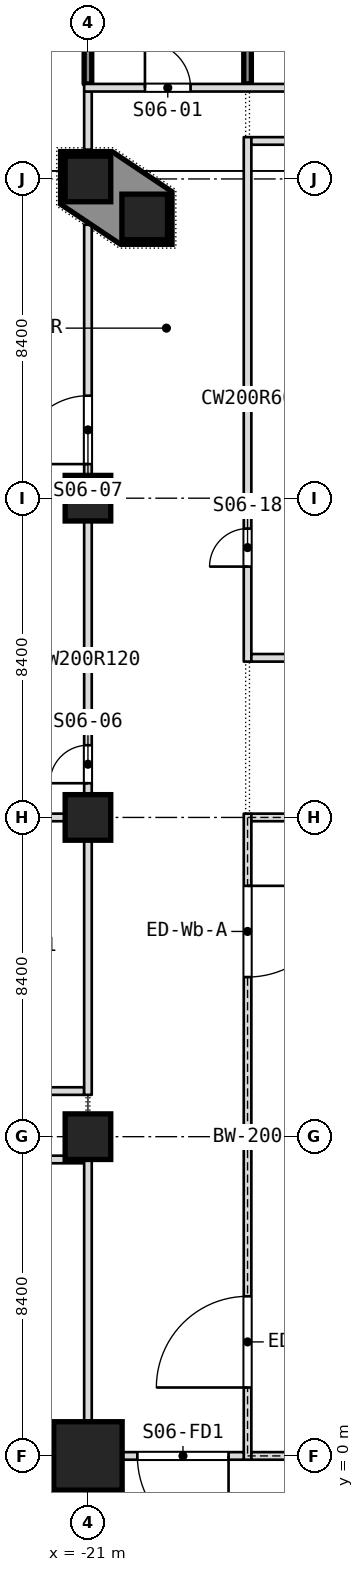
"""IFC4 building model, lengths in metres.
Left out: names, types, materials, properties, quantities, classifications, styles, units other than length and angle.
Written with IfcOpenShell. Run it as: python <this file> out.ifc"""

import sys

from ifc_helpers import new_model, si_unit, direction, frame, frame_2d, origin, origin_2d, place, context, subcontext, project, spatial, polyline, rectangle, outline, extrude, element, fill, save


model = new_model("IFC4")
c1 = context("Model", 3, precision=1e-05, world=origin(), true_north=direction((0.0, 1.0)))
c2 = subcontext(c1, "Body", "Model", "MODEL_VIEW")
j1 = project(units=[si_unit("LENGTHUNIT", "METRE"), si_unit("PLANEANGLEUNIT", "RADIAN")], contexts=[c1])
p1 = place(None, origin())
s1 = spatial("IfcSite", under=j1, at=p1, CompositionType="ELEMENT")
p2 = place(p1, origin())
s2 = spatial("IfcBuilding", under=s1, at=p2, CompositionType="ELEMENT")
p3 = place(p2, frame((0.0, 0.0, 31.0)))
s3 = spatial("IfcBuildingStorey", under=s2, at=p3, CompositionType="ELEMENT", Elevation=31.0)
p4 = place(p3, frame((-21.0, 0.0, 0.0), z_axis=(0.0, 0.0, 1.0), x_axis=(1.0, 0.0, 0.0)))
e1 = element("IfcColumn", 1, at=p4, inside=s3, PredefinedType="COLUMN", context=c2, shape_type="SweptSolid", body=[
    extrude(rectangle(XDim=1.8, YDim=1.8, at=origin_2d()), origin(), (0.0, 0.0, 1.0), 5.5),
])
for number, where, z_axis, x_axis in (
    (2, (-21.0, 8.4, 0.0), (0.0, 0.0, 1.0), (1.0, 0.0, 0.0)),
    (3, (-21.0, 16.8, 0.0), (0.0, 0.0, 1.0), (1.0, 0.0, 0.0)),
    (4, (-21.0, 25.2, 0.0), (0.0, 0.0, 1.0), (1.0, 0.0, 0.0)),
    (5, (-21.0, 33.6, 0.0), (0.0, 0.0, 1.0), (1.0, 0.0, 0.0)),
    (6, (-19.507, 32.6, 0.0), (0.0, 0.0, 1.0), (1.0, 0.0, 0.0)),
):
    element("IfcColumn", number, at=place(p3, frame(where, z_axis=z_axis, x_axis=x_axis)), inside=s3, PredefinedType="COLUMN", context=c2, shape_type="SweptSolid", body=[
        extrude(rectangle(XDim=1.2, YDim=1.2, at=origin_2d()), origin(), (0.0, 0.0, 1.0), 5.5),
    ])
p5 = place(p3, frame((-37.74, 7.8, 0.0), z_axis=(0.0, 0.0, 1.0), x_axis=(1.0, 0.0, 0.0)))
e7 = element("IfcWall", 7, at=p5, inside=s3, PredefinedType="PARTITIONING", context=c2, shape_type="SweptSolid", body=[
    extrude(rectangle(XDim=16.64, YDim=0.2, at=frame_2d((8.32, 0.0))), origin(), (0.0, 0.0, 1.0), 5.35),
])
p6 = place(p5, frame((10.665, 0.0, 0.0)))
e8 = element("IfcOpeningElement", 8, at=p6, cuts=e7, PredefinedType="OPENING", context=c2, shape_type="SweptSolid", body=[
    extrude(rectangle(XDim=1.0, YDim=2.1, at=frame_2d((0.5, 1.05))), frame((0.0, 0.1, 0.0), z_axis=(0.0, -1.0, 0.0), x_axis=(1.0, 0.0, 0.0)), (0.0, 0.0, 1.0), 0.2),
])
p7 = place(p3, frame((-37.74, 9.6, 0.0), z_axis=(0.0, 0.0, 1.0), x_axis=(1.0, 0.0, 0.0)))
e9 = element("IfcWall", 9, at=p7, inside=s3, PredefinedType="PARTITIONING", context=c2, shape_type="SweptSolid", body=[
    extrude(rectangle(XDim=16.64, YDim=0.2, at=frame_2d((8.32, 0.0))), origin(), (0.0, 0.0, 1.0), 4.634),
])
p8 = place(p7, frame((10.64, 0.0, 0.0)))
e10 = element("IfcOpeningElement", 10, at=p8, cuts=e9, PredefinedType="OPENING", context=c2, shape_type="SweptSolid", body=[
    extrude(rectangle(XDim=1.0, YDim=2.1, at=frame_2d((0.5, 1.05))), frame((0.0, 0.1, 0.0), z_axis=(0.0, -1.0, 0.0), x_axis=(1.0, 0.0, 0.0)), (0.0, 0.0, 1.0), 0.2),
])
p9 = place(p7, frame((1.44, 0.0, 0.0)))
e11 = element("IfcOpeningElement", 11, at=p9, cuts=e9, PredefinedType="OPENING", context=c2, shape_type="SweptSolid", body=[
    extrude(rectangle(XDim=1.2, YDim=2.1, at=frame_2d((0.6, 1.05))), frame((0.0, 0.1, 0.0), z_axis=(0.0, -1.0, 0.0), x_axis=(1.0, 0.0, 0.0)), (0.0, 0.0, 1.0), 0.2),
])
p10 = place(p3, frame((-16.8, 20.9, 0.0), z_axis=(0.0, 0.0, 1.0), x_axis=(0.0, 1.0, 0.0)))
e12 = element("IfcWall", 12, at=p10, inside=s3, PredefinedType="PARTITIONING", context=c2, shape_type="SweptSolid", body=[
    extrude(rectangle(XDim=13.8, YDim=0.2, at=frame_2d((6.9, 0.0))), origin(), (0.0, 0.0, 1.0), 4.95),
])
p11 = place(p10, frame((2.5, 0.0, 0.0)))
e13 = element("IfcOpeningElement", 13, at=p11, cuts=e12, PredefinedType="OPENING", context=c2, shape_type="SweptSolid", body=[
    extrude(rectangle(XDim=1.0, YDim=2.1, at=frame_2d((0.5, 1.05))), frame((0.0, 0.1, 0.0), z_axis=(0.0, -1.0, 0.0), x_axis=(1.0, 0.0, 0.0)), (0.0, 0.0, 1.0), 0.2),
])
p12 = place(p3, frame((-16.8, 36.1, 0.0), z_axis=(0.0, 0.0, 1.0), x_axis=(0.0, 1.0, 0.0)))
e14 = element("IfcWall", 14, at=p12, inside=s3, PredefinedType="PARTITIONING", context=c2, shape_type="SweptSolid", body=[
    extrude(rectangle(XDim=5.84, YDim=0.2, at=frame_2d((2.92, 0.0))), origin(), (0.0, 0.0, 1.0), 5.35),
])
p13 = place(p3, frame((-27.63, 16.8, 0.0), z_axis=(0.0, 0.0, 1.0), x_axis=(1.0, 0.0, 0.0)))
e15 = element("IfcWall", 15, at=p13, inside=s3, PredefinedType="PARTITIONING", context=c2, shape_type="SweptSolid", body=[
    extrude(rectangle(XDim=6.53, YDim=0.2, at=frame_2d((3.265, 0.0))), origin(), (0.0, 0.0, 1.0), 4.85),
])
p14 = place(p3, frame((-21.0, -0.3, 0.0), z_axis=(0.0, 0.0, 1.0), x_axis=(0.0, 1.0, 0.0)))
e16 = element("IfcWall", 16, at=p14, inside=s3, PredefinedType="PARTITIONING", context=c2, shape_type="SweptSolid", body=[
    extrude(rectangle(XDim=8.2, YDim=0.2, at=frame_2d((4.1, 0.0))), origin(), (0.0, 0.0, 1.0), 4.95),
])
p15 = place(p3, frame((-21.0, 9.5, 0.0), z_axis=(0.0, 0.0, 1.0), x_axis=(0.0, 1.0, 0.0)))
e17 = element("IfcWall", 17, at=p15, inside=s3, PredefinedType="PARTITIONING", context=c2, shape_type="SweptSolid", body=[
    extrude(rectangle(XDim=22.894, YDim=0.2, at=frame_2d((11.447, 0.0))), origin(), (0.0, 0.0, 1.0), 4.95),
])
p16 = place(p15, frame((8.2, 0.0, 0.0)))
e18 = element("IfcOpeningElement", 18, at=p16, cuts=e17, PredefinedType="OPENING", context=c2, shape_type="SweptSolid", body=[
    extrude(rectangle(XDim=1.0, YDim=2.1, at=frame_2d((0.5, 1.05))), frame((0.0, 0.1, 0.0), z_axis=(0.0, -1.0, 0.0), x_axis=(1.0, 0.0, 0.0)), (0.0, 0.0, 1.0), 0.2),
])
p17 = place(p15, frame((16.597, 0.0, 0.0)))
e19 = element("IfcOpeningElement", 19, at=p17, cuts=e17, PredefinedType="OPENING", context=c2, shape_type="SweptSolid", body=[
    extrude(rectangle(XDim=1.8, YDim=2.1, at=frame_2d((0.9, 1.05))), frame((0.0, 0.1, 0.0), z_axis=(0.0, -1.0, 0.0), x_axis=(1.0, 0.0, 0.0)), (0.0, 0.0, 1.0), 0.2),
])
p18 = place(p3, frame((-21.0, 34.37, 0.0), z_axis=(0.0, 0.0, 1.0), x_axis=(0.0, 1.0, 0.0)))
e20 = element("IfcWall", 20, at=p18, inside=s3, PredefinedType="PARTITIONING", context=c2, shape_type="SweptSolid", body=[
    extrude(rectangle(XDim=1.53, YDim=0.2, at=frame_2d((0.765, 0.0))), origin(), (0.0, 0.0, 1.0), 5.35),
])
p19 = place(p3, frame((-21.0, 36.1, 0.0), z_axis=(0.0, 0.0, 1.0), x_axis=(0.0, 1.0, 0.0)))
e21 = element("IfcWall", 21, at=p19, inside=s3, PredefinedType="PARTITIONING", context=c2, shape_type="SweptSolid", body=[
    extrude(rectangle(XDim=6.2, YDim=0.2, at=frame_2d((3.1, 0.0))), origin(), (0.0, 0.0, 1.0), 5.35),
])
p20 = place(p3, frame((-16.7, 21.0, 0.0), z_axis=(0.0, 0.0, 1.0), x_axis=(1.0, 0.0, 0.0)))
e22 = element("IfcWall", 22, at=p20, inside=s3, PredefinedType="PARTITIONING", context=c2, shape_type="SweptSolid", body=[
    extrude(rectangle(XDim=21.0, YDim=0.2, at=frame_2d((10.5, 0.0))), origin(), (0.0, 0.0, 1.0), 5.35),
])
p21 = place(p20, frame((11.6, 0.0, 0.0)))
e23 = element("IfcOpeningElement", 23, at=p21, cuts=e22, PredefinedType="OPENING", context=c2, shape_type="SweptSolid", body=[
    extrude(rectangle(XDim=1.8, YDim=2.1, at=frame_2d((0.9, 1.05))), frame((0.0, 0.1, 0.0), z_axis=(0.0, -1.0, 0.0), x_axis=(1.0, 0.0, 0.0)), (0.0, 0.0, 1.0), 0.2),
])
p22 = place(p3, frame((-27.865, 25.2, 0.0), z_axis=(0.0, 0.0, 1.0), x_axis=(1.0, 0.0, 0.0)))
e24 = element("IfcWall", 24, at=p22, inside=s3, PredefinedType="PARTITIONING", context=c2, shape_type="SweptSolid", body=[
    extrude(rectangle(XDim=6.765, YDim=0.2, at=frame_2d((3.382, 0.0))), origin(), (0.0, 0.0, 1.0), 4.85),
])
p23 = place(p3, frame((-16.7, 34.6, 0.0), z_axis=(0.0, 0.0, 1.0), x_axis=(1.0, 0.0, 0.0)))
e25 = element("IfcWall", 25, at=p23, inside=s3, PredefinedType="PARTITIONING", context=c2, shape_type="SweptSolid", body=[
    extrude(rectangle(XDim=3.33, YDim=0.2, at=frame_2d((1.665, 0.0))), origin(), (0.0, 0.0, 1.0), 5.35),
])
p24 = place(p3, frame((-21.1, 36.0, 0.0), z_axis=(0.0, 0.0, 1.0), x_axis=(1.0, 0.0, 0.0)))
e26 = element("IfcWall", 26, at=p24, inside=s3, PredefinedType="PARTITIONING", context=c2, shape_type="SweptSolid", body=[
    extrude(rectangle(XDim=23.3, YDim=0.2, at=frame_2d((11.65, 0.0))), origin(), (0.0, 0.0, 1.0), 5.35),
])
p25 = place(p24, frame((1.6, 0.0, 0.0)))
e27 = element("IfcOpeningElement", 27, at=p25, cuts=e26, PredefinedType="OPENING", context=c2, shape_type="SweptSolid", body=[
    extrude(rectangle(XDim=1.2, YDim=2.1, at=frame_2d((0.6, 1.05))), frame((0.0, 0.1, 0.0), z_axis=(0.0, -1.0, 0.0), x_axis=(1.0, 0.0, 0.0)), (0.0, 0.0, 1.0), 0.2),
])
p26 = place(p24, frame((6.0, 0.0, 0.0)))
e28 = element("IfcOpeningElement", 28, at=p26, cuts=e26, PredefinedType="OPENING", context=c2, shape_type="SweptSolid", body=[
    extrude(rectangle(XDim=1.0, YDim=2.1, at=frame_2d((0.5, 1.05))), frame((0.0, 0.1, 0.0), z_axis=(0.0, -1.0, 0.0), x_axis=(1.0, 0.0, 0.0)), (0.0, 0.0, 1.0), 0.2),
])
p27 = place(p24, frame((13.15, 0.0, 0.0)))
e29 = element("IfcOpeningElement", 29, at=p27, cuts=e26, PredefinedType="OPENING", context=c2, shape_type="SweptSolid", body=[
    extrude(rectangle(XDim=1.0, YDim=2.1, at=frame_2d((0.5, 1.05))), frame((0.0, 0.1, 0.0), z_axis=(0.0, -1.0, 0.0), x_axis=(1.0, 0.0, 0.0)), (0.0, 0.0, 1.0), 0.2),
])
p28 = place(p24, frame((20.5, 0.0, 0.0)))
e30 = element("IfcOpeningElement", 30, at=p28, cuts=e26, PredefinedType="OPENING", context=c2, shape_type="SweptSolid", body=[
    extrude(rectangle(XDim=1.2, YDim=2.1, at=frame_2d((0.6, 1.05))), frame((0.0, 0.1, 0.0), z_axis=(0.0, -1.0, 0.0), x_axis=(1.0, 0.0, 0.0)), (0.0, 0.0, 1.0), 0.2),
])
p29 = place(p3, frame((-16.8, -0.1, 0.0), z_axis=(0.0, 0.0, 1.0), x_axis=(0.0, 1.0, 0.0)))
e31 = element("IfcWall", 31, at=p29, inside=s3, PredefinedType="PARTITIONING", context=c2, shape_type="SweptSolid", body=[
    extrude(rectangle(XDim=17.0, YDim=0.2, at=frame_2d((8.5, 0.0))), origin(), (0.0, 0.0, 1.0), 4.95),
])
p30 = place(p29, frame((1.9, 0.0, 0.0)))
e32 = element("IfcOpeningElement", 32, at=p30, cuts=e31, PredefinedType="OPENING", context=c2, shape_type="SweptSolid", body=[
    extrude(rectangle(XDim=2.4, YDim=2.1, at=frame_2d((1.2, 1.05))), frame((0.0, 0.1, 0.0), z_axis=(0.0, -1.0, 0.0), x_axis=(1.0, 0.0, 0.0)), (0.0, 0.0, 1.0), 0.2),
])
p31 = place(p29, frame((12.7, 0.0, 0.0)))
e33 = element("IfcOpeningElement", 33, at=p31, cuts=e31, PredefinedType="OPENING", context=c2, shape_type="SweptSolid", body=[
    extrude(rectangle(XDim=2.4, YDim=2.1, at=frame_2d((1.2, 1.05))), frame((0.0, 0.1, 0.0), z_axis=(0.0, -1.0, 0.0), x_axis=(1.0, 0.0, 0.0)), (0.0, 0.0, 1.0), 0.2),
])
for number, where, z_axis, x_axis in (
    (34, (-16.7, 0.0, 0.0), (0.0, 0.0, 1.0), (1.0, 0.0, 0.0)),
    (35, (-16.7, 16.8, 0.0), (0.0, 0.0, 1.0), (1.0, 0.0, 0.0)),
):
    element("IfcWall", number, at=place(p3, frame(where, z_axis=z_axis, x_axis=x_axis)), inside=s3, PredefinedType="PARTITIONING", context=c2, shape_type="SweptSolid", body=[
        extrude(rectangle(XDim=4.1, YDim=0.2, at=frame_2d((2.05, 0.0))), origin(), (0.0, 0.0, 1.0), 4.85),
    ])
p32 = place(p3, origin())
e36 = element("IfcWall", 36, at=p32, inside=s3, PredefinedType="SOLIDWALL", context=c2, shape_type="SweptSolid", body=[
    extrude(outline(polyline([(-21.72, 34.32), (-20.364, 34.32), (-18.787, 33.264), (-18.787, 31.88), (-20.143, 31.88), (-21.72, 32.936), (-21.72, 34.32)]), holes=[polyline([(-18.907, 32.0), (-18.907, 33.2), (-20.107, 33.2), (-20.107, 32.0), (-18.907, 32.0)]), polyline([(-20.4, 33.0), (-20.4, 34.2), (-21.6, 34.2), (-21.6, 33.0), (-20.4, 33.0)])]), origin(), (0.0, 0.0, 1.0), 5.5),
])
p33 = place(p3, frame((-26.462, 0.0, 0.0), z_axis=(0.0, 0.0, 1.0), x_axis=(1.0, 0.0, 0.0)))
e37 = element("IfcWall", 37, at=p33, inside=s3, PredefinedType="PARTITIONING", context=c2, shape_type="SweptSolid", body=[
    extrude(rectangle(XDim=4.561, YDim=0.2, at=frame_2d((2.281, 0.0))), origin(), (0.0, 0.0, 1.0), 4.85),
])
p34 = place(p3, frame((-20.099, 0.0, 0.0), z_axis=(0.0, 0.0, 1.0), x_axis=(1.0, 0.0, 0.0)))
e38 = element("IfcWall", 38, at=p34, inside=s3, PredefinedType="PARTITIONING", context=c2, shape_type="SweptSolid", body=[
    extrude(rectangle(XDim=3.198, YDim=0.2, at=frame_2d((1.599, 0.0))), origin(), (0.0, 0.0, 1.0), 4.85),
])
p35 = place(p34, frame((0.399, 0.0, 0.0)))
e39 = element("IfcOpeningElement", 39, at=p35, cuts=e38, PredefinedType="OPENING", context=c2, shape_type="SweptSolid", body=[
    extrude(rectangle(XDim=2.4, YDim=2.1, at=frame_2d((1.2, 1.05))), frame((0.0, 0.1, 0.0), z_axis=(0.0, -1.0, 0.0), x_axis=(1.0, 0.0, 0.0)), (0.0, 0.0, 1.0), 0.2),
])
p36 = place(p25, origin())
e40 = element("IfcDoor", 40, at=p36, inside=s3, OperationType="SINGLE_SWING_RIGHT", PredefinedType="DOOR", context=c2, shape_type="SweptSolid", body=[
    extrude(rectangle(XDim=1.2, YDim=2.1, at=frame_2d((0.6, 1.05))), frame((0.0, 0.025, 0.0), z_axis=(0.0, -1.0, 0.0), x_axis=(1.0, 0.0, 0.0)), (0.0, 0.0, 1.0), 0.05),
])
fill(e27, e40)
p37 = place(p16, origin())
e41 = element("IfcDoor", 41, at=p37, inside=s3, OperationType="SINGLE_SWING_RIGHT", PredefinedType="DOOR", context=c2, shape_type="SweptSolid", body=[
    extrude(rectangle(XDim=1.0, YDim=2.1, at=frame_2d((0.5, 1.05))), frame((0.0, 0.025, 0.0), z_axis=(0.0, -1.0, 0.0), x_axis=(1.0, 0.0, 0.0)), (0.0, 0.0, 1.0), 0.05),
])
fill(e18, e41)
p38 = place(p17, origin())
e42 = element("IfcDoor", 42, at=p38, inside=s3, OperationType="DOUBLE_DOOR_SINGLE_SWING", PredefinedType="DOOR", context=c2, shape_type="SweptSolid", body=[
    extrude(rectangle(XDim=1.8, YDim=2.1, at=frame_2d((0.9, 1.05))), frame((0.0, 0.025, 0.0), z_axis=(0.0, -1.0, 0.0), x_axis=(1.0, 0.0, 0.0)), (0.0, 0.0, 1.0), 0.05),
])
fill(e19, e42)
p39 = place(p11, origin())
e43 = element("IfcDoor", 43, at=p39, inside=s3, OperationType="SINGLE_SWING_LEFT", PredefinedType="DOOR", context=c2, shape_type="SweptSolid", body=[
    extrude(rectangle(XDim=1.0, YDim=2.1, at=frame_2d((0.5, 1.05))), frame((0.0, 0.025, 0.0), z_axis=(0.0, -1.0, 0.0), x_axis=(1.0, 0.0, 0.0)), (0.0, 0.0, 1.0), 0.05),
])
fill(e13, e43)
p40 = place(p30, origin())
e44 = element("IfcDoor", 44, at=p40, inside=s3, OperationType="DOUBLE_DOOR_SINGLE_SWING", PredefinedType="DOOR", context=c2, shape_type="SweptSolid", body=[
    extrude(rectangle(XDim=2.4, YDim=2.1, at=frame_2d((1.2, 1.05))), frame((0.0, 0.025, 0.0), z_axis=(0.0, -1.0, 0.0), x_axis=(1.0, 0.0, 0.0)), (0.0, 0.0, 1.0), 0.05),
])
fill(e32, e44)
p41 = place(p31, origin())
e45 = element("IfcDoor", 45, at=p41, inside=s3, OperationType="DOUBLE_DOOR_SINGLE_SWING", PredefinedType="DOOR", context=c2, shape_type="SweptSolid", body=[
    extrude(rectangle(XDim=2.4, YDim=2.1, at=frame_2d((1.2, 1.05))), frame((0.0, 0.025, 0.0), z_axis=(0.0, -1.0, 0.0), x_axis=(1.0, 0.0, 0.0)), (0.0, 0.0, 1.0), 0.05),
])
fill(e33, e45)
p42 = place(p35, origin())
e46 = element("IfcDoor", 46, at=p42, inside=s3, OperationType="DOUBLE_DOOR_DOUBLE_SWING", PredefinedType="DOOR", context=c2, shape_type="SweptSolid", body=[
    extrude(rectangle(XDim=2.4, YDim=2.1, at=frame_2d((1.2, 1.05))), frame((0.0, 0.025, 0.0), z_axis=(0.0, -1.0, 0.0), x_axis=(1.0, 0.0, 0.0)), (0.0, 0.0, 1.0), 0.05),
])
fill(e39, e46)
save(model, sys.argv[1])
